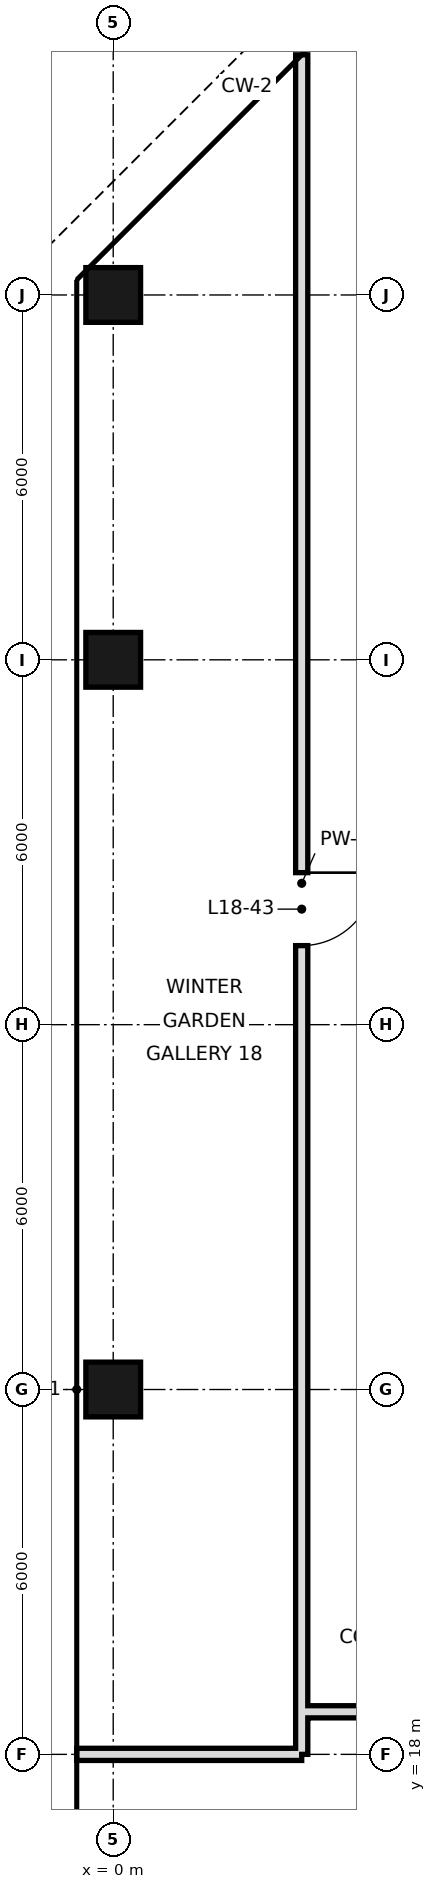
"""IFC4 building model, lengths in metres.
Left out: names, types, materials, properties, quantities, classifications, styles, units other than length and angle.
Written with IfcOpenShell. Run it as: python <this file> out.ifc"""

import sys

from ifc_helpers import new_model, si_unit, direction, frame, frame_2d, origin, origin_2d, place, context, subcontext, project, spatial, rectangle, hollow_rectangle, extrude, element, fill, save


model = new_model("IFC4")
c1 = context("Model", 3, precision=1e-05, world=origin(), true_north=direction((0.0, 1.0)))
c2 = subcontext(c1, "Body", "Model", "MODEL_VIEW")
j1 = project(units=[si_unit("LENGTHUNIT", "METRE"), si_unit("PLANEANGLEUNIT", "RADIAN")], contexts=[c1])
p1 = place(None, origin())
s1 = spatial("IfcSite", under=j1, at=p1, CompositionType="ELEMENT")
p2 = place(p1, origin())
s2 = spatial("IfcBuilding", under=s1, at=p2, CompositionType="ELEMENT")
p3 = place(p2, frame((0.0, 0.0, 85.8)))
s3 = spatial("IfcBuildingStorey", under=s2, at=p3, CompositionType="ELEMENT", Elevation=85.8)
for number, where, z_axis, x_axis in (
    (1, (0.0, 24.0, 0.0), (0.0, 0.0, 1.0), (1.0, 0.0, 0.0)),
    (2, (0.0, 36.0, 0.0), (0.0, 0.0, 1.0), (1.0, 0.0, 0.0)),
    (3, (0.0, 42.0, 0.0), (0.0, 0.0, 1.0), (1.0, 0.0, 0.0)),
):
    element("IfcColumn", number, at=place(p3, frame(where, z_axis=z_axis, x_axis=x_axis)), inside=s3, PredefinedType="COLUMN", context=c2, shape_type="SweptSolid", body=[
        extrude(hollow_rectangle(XDim=0.9, YDim=0.9, WallThickness=0.045, at=origin_2d()), origin(), (0.0, 0.0, 1.0), 4.4),
    ])
p4 = place(p3, frame((3.1, 18.7, 0.0), z_axis=(0.0, 0.0, 1.0), x_axis=(0.0, 1.0, 0.0)))
e4 = element("IfcWall", 4, at=p4, inside=s3, PredefinedType="SOLIDWALL", context=c2, shape_type="SweptSolid", body=[
    extrude(rectangle(XDim=27.249, YDim=0.2, at=frame_2d((13.625, 0.0))), origin(), (0.0, 0.0, 1.0), 3.65),
])
p5 = place(p4, frame((12.6, 0.0, 0.0)))
e5 = element("IfcOpeningElement", 5, at=p5, cuts=e4, PredefinedType="OPENING", context=c2, shape_type="SweptSolid", body=[
    extrude(rectangle(XDim=1.2, YDim=2.4, at=frame_2d((0.6, 1.2))), frame((0.0, 0.11, 0.0), z_axis=(0.0, -1.0, 0.0), x_axis=(1.0, 0.0, 0.0)), (0.0, 0.0, 1.0), 0.22),
])
p6 = place(p3, frame((3.1, 18.0, 0.0), z_axis=(0.0, 0.0, 1.0), x_axis=(0.0, 1.0, 0.0)))
e6 = element("IfcWall", 6, at=p6, inside=s3, PredefinedType="SOLIDWALL", context=c2, shape_type="SweptSolid", body=[
    extrude(rectangle(XDim=0.7, YDim=0.2, at=frame_2d((0.35, 0.0))), origin(), (0.0, 0.0, 1.0), 3.65),
])
p7 = place(p3, frame((-0.6, 18.0, 0.0), z_axis=(0.0, 0.0, 1.0), x_axis=(1.0, 0.0, 0.0)))
e7 = element("IfcWall", 7, at=p7, inside=s3, PredefinedType="SOLIDWALL", context=c2, shape_type="SweptSolid", body=[
    extrude(rectangle(XDim=3.7, YDim=0.2, at=frame_2d((1.85, 0.0))), origin(), (0.0, 0.0, 1.0), 3.4),
])
p8 = place(p3, frame((3.1, 18.7, 0.0), z_axis=(0.0, 0.0, 1.0), x_axis=(1.0, 0.0, 0.0)))
e8 = element("IfcWall", 8, at=p8, inside=s3, PredefinedType="SOLIDWALL", context=c2, shape_type="SweptSolid", body=[
    extrude(rectangle(XDim=2.3, YDim=0.2, at=frame_2d((1.15, 0.0))), origin(), (0.0, 0.0, 1.0), 4.1),
])
p9 = place(p5, origin())
e9 = element("IfcDoor", 9, at=p9, inside=s3, OperationType="SINGLE_SWING_RIGHT", PredefinedType="DOOR", context=c2, shape_type="SweptSolid", body=[
    extrude(rectangle(XDim=1.2, YDim=2.4, at=frame_2d((0.6, 1.2))), frame((0.0, 0.025, 0.0), z_axis=(0.0, -1.0, 0.0), x_axis=(1.0, 0.0, 0.0)), (0.0, 0.0, 1.0), 0.05),
])
fill(e5, e9)
save(model, sys.argv[1])
